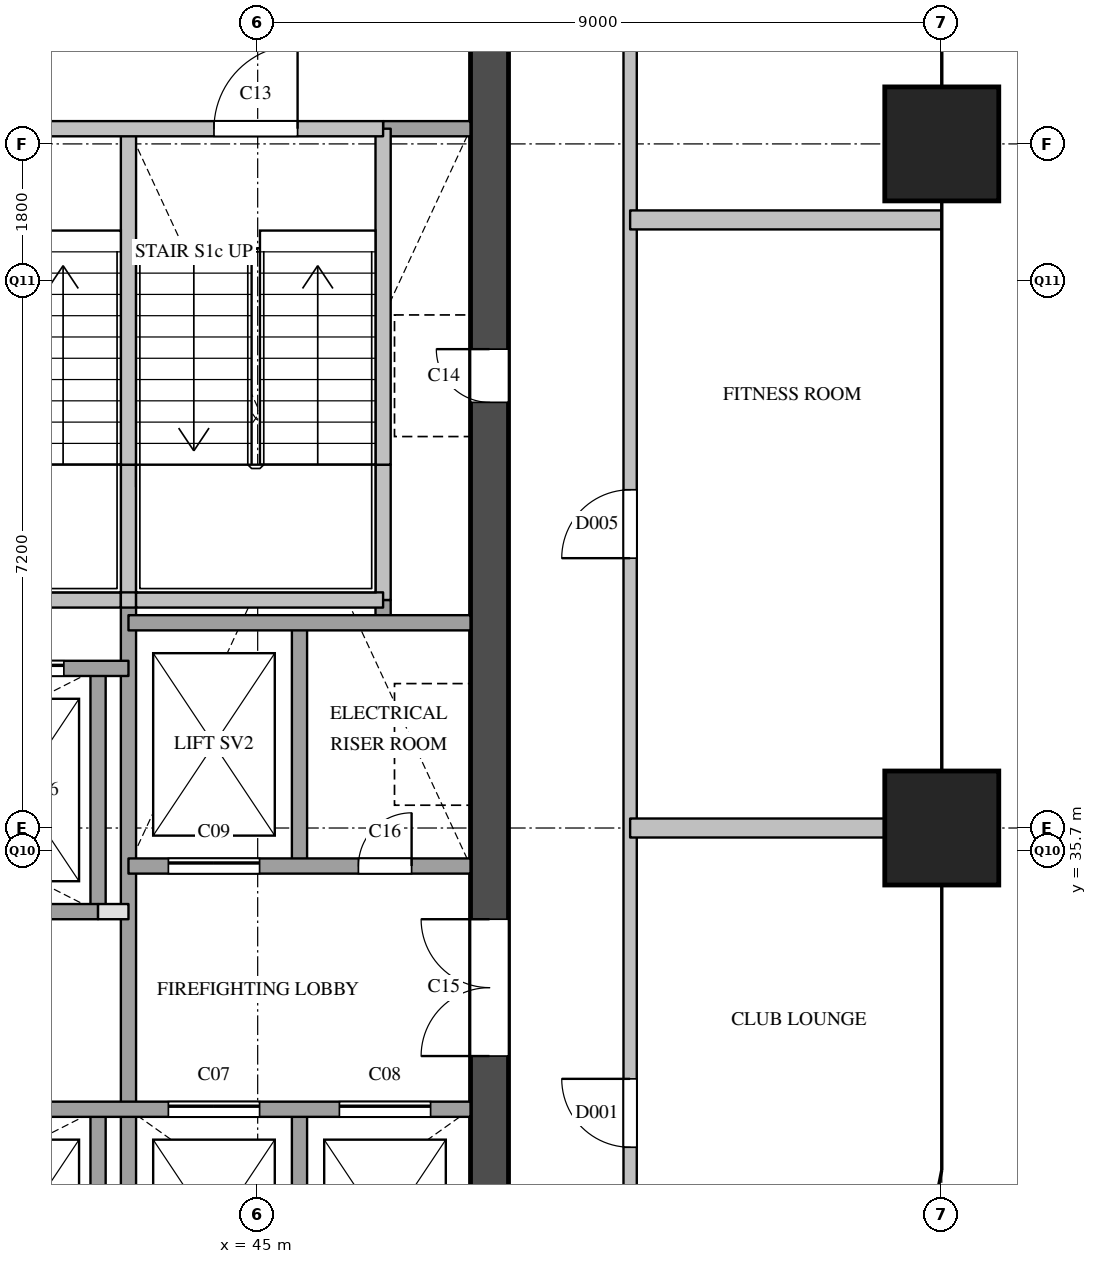
"""IFC4 building model, lengths in metres.
Left out: names, types, materials, properties, quantities, classifications, styles, units other than length and angle.
Written with IfcOpenShell. Run it as: python <this file> out.ifc"""

import sys

from ifc_helpers import new_model, si_unit, direction, frame, frame_2d, origin, origin_2d, place, context, subcontext, project, spatial, rectangle, extrude, element, fill, save


model = new_model("IFC4")
c1 = context("Model", 3, precision=1e-05, world=origin(), true_north=direction((0.0, 1.0)))
c2 = subcontext(c1, "Body", "Model", "MODEL_VIEW")
j1 = project(units=[si_unit("LENGTHUNIT", "METRE"), si_unit("PLANEANGLEUNIT", "RADIAN")], contexts=[c1])
p1 = place(None, origin())
s1 = spatial("IfcSite", under=j1, at=p1, CompositionType="ELEMENT")
p2 = place(p1, origin())
s2 = spatial("IfcBuilding", under=s1, at=p2, CompositionType="ELEMENT")
p3 = place(p2, frame((0.0, 0.0, 138.8)))
s3 = spatial("IfcBuildingStorey", under=s2, at=p3, CompositionType="ELEMENT", Elevation=138.8)
for number, where, z_axis, x_axis in (
    (1, (54.0, 36.0, 0.0), (0.0, 0.0, 1.0), (1.0, 0.0, 0.0)),
    (2, (54.0, 45.0, 0.0), (0.0, 0.0, 1.0), (1.0, 0.0, 0.0)),
):
    element("IfcColumn", number, at=place(p3, frame(where, z_axis=z_axis, x_axis=x_axis)), inside=s3, PredefinedType="COLUMN", context=c2, shape_type="SweptSolid", body=[
        extrude(rectangle(XDim=1.5, YDim=1.5, at=origin_2d()), origin(), (0.0, 0.0, 1.0), 3.9),
    ])
p4 = place(p3, frame((48.05, 29.1, 0.0), z_axis=(0.0, 0.0, 1.0), x_axis=(0.0, 1.0, 0.0)))
e3 = element("IfcWall", 3, at=p4, inside=s3, PredefinedType="SHEAR", context=c2, shape_type="SweptSolid", body=[
    extrude(rectangle(XDim=20.3, YDim=0.5, at=frame_2d((10.15, 0.0))), origin(), (0.0, 0.0, 1.0), 3.6),
])
p5 = place(p4, frame((12.5, 0.0, 0.0)))
e4 = element("IfcOpeningElement", 4, at=p5, cuts=e3, PredefinedType="OPENING", context=c2, shape_type="SweptSolid", body=[
    extrude(rectangle(XDim=0.7, YDim=2.1, at=frame_2d((0.35, 1.05))), frame((0.0, 0.26, 0.0), z_axis=(0.0, -1.0, 0.0), x_axis=(1.0, 0.0, 0.0)), (0.0, 0.0, 1.0), 0.52),
])
p6 = place(p4, frame((3.9, 0.0, 0.0)))
e5 = element("IfcOpeningElement", 5, at=p6, cuts=e3, PredefinedType="OPENING", context=c2, shape_type="SweptSolid", body=[
    extrude(rectangle(XDim=1.8, YDim=2.1, at=frame_2d((0.9, 1.05))), frame((0.0, 0.26, 0.0), z_axis=(0.0, -1.0, 0.0), x_axis=(1.0, 0.0, 0.0)), (0.0, 0.0, 1.0), 0.52),
])
p7 = place(p3, frame((42.9, 29.1, 0.0), z_axis=(0.0, 0.0, 1.0), x_axis=(0.0, 1.0, 0.0)))
e6 = element("IfcWall", 6, at=p7, inside=s3, PredefinedType="SOLIDWALL", context=c2, shape_type="SweptSolid", body=[
    extrude(rectangle(XDim=3.2, YDim=0.2, at=frame_2d((1.6, 0.0))), origin(), (0.0, 0.0, 1.0), 3.6),
])
p8 = place(p3, frame((42.9, 34.9, 0.0), z_axis=(0.0, 0.0, 1.0), x_axis=(0.0, 1.0, 0.0)))
e7 = element("IfcWall", 7, at=p8, inside=s3, PredefinedType="SOLIDWALL", context=c2, shape_type="SweptSolid", body=[
    extrude(rectangle(XDim=3.2, YDim=0.2, at=frame_2d((1.6, 0.0))), origin(), (0.0, 0.0, 1.0), 3.6),
])
p9 = place(p3, frame((43.3, 29.1, 0.0), z_axis=(0.0, 0.0, 1.0), x_axis=(0.0, 1.0, 0.0)))
e8 = element("IfcWall", 8, at=p9, inside=s3, PredefinedType="SOLIDWALL", context=c2, shape_type="SweptSolid", body=[
    extrude(rectangle(XDim=9.9, YDim=0.2, at=frame_2d((4.95, 0.0))), origin(), (0.0, 0.0, 1.0), 3.6),
])
p10 = place(p3, frame((43.3, 39.0, 0.0), z_axis=(0.0, 0.0, 1.0), x_axis=(0.0, 1.0, 0.0)))
e9 = element("IfcWall", 9, at=p10, inside=s3, PredefinedType="SOLIDWALL", context=c2, shape_type="SweptSolid", body=[
    extrude(rectangle(XDim=1.78, YDim=0.2, at=frame_2d((0.89, 0.0))), origin(), (0.0, 0.0, 1.0), 3.6),
])
p11 = place(p3, frame((43.3, 40.78, 0.0), z_axis=(0.0, 0.0, 1.0), x_axis=(0.0, 1.0, 0.0)))
e10 = element("IfcWall", 10, at=p11, inside=s3, PredefinedType="SOLIDWALL", context=c2, shape_type="SweptSolid", body=[
    extrude(rectangle(XDim=4.42, YDim=0.2, at=frame_2d((2.21, 0.0))), origin(), (0.0, 0.0, 1.0), 3.6),
])
for number, where, z_axis, x_axis in (
    (11, (45.55, 29.1, 0.0), (0.0, 0.0, 1.0), (0.0, 1.0, 0.0)),
    (12, (45.55, 35.5, 0.0), (0.0, 0.0, 1.0), (0.0, 1.0, 0.0)),
):
    element("IfcWall", number, at=place(p3, frame(where, z_axis=z_axis, x_axis=x_axis)), inside=s3, PredefinedType="SOLIDWALL", context=c2, shape_type="SweptSolid", body=[
        extrude(rectangle(XDim=3.2, YDim=0.2, at=frame_2d((1.6, 0.0))), origin(), (0.0, 0.0, 1.0), 3.6),
    ])
p12 = place(p3, frame((46.65, 38.7, 0.0), z_axis=(0.0, 0.0, 1.0), x_axis=(0.0, 1.0, 0.0)))
e13 = element("IfcWall", 13, at=p12, inside=s3, PredefinedType="SOLIDWALL", context=c2, shape_type="SweptSolid", body=[
    extrude(rectangle(XDim=0.3, YDim=0.2, at=frame_2d((0.15, 0.0))), origin(), (0.0, 0.0, 1.0), 3.6),
])
p13 = place(p3, frame((46.65, 39.0, 0.0), z_axis=(0.0, 0.0, 1.0), x_axis=(0.0, 1.0, 0.0)))
e14 = element("IfcWall", 14, at=p13, inside=s3, PredefinedType="SOLIDWALL", context=c2, shape_type="SweptSolid", body=[
    extrude(rectangle(XDim=1.78, YDim=0.2, at=frame_2d((0.89, 0.0))), origin(), (0.0, 0.0, 1.0), 3.6),
])
p14 = place(p3, frame((46.65, 40.78, 0.0), z_axis=(0.0, 0.0, 1.0), x_axis=(0.0, 1.0, 0.0)))
e15 = element("IfcWall", 15, at=p14, inside=s3, PredefinedType="SOLIDWALL", context=c2, shape_type="SweptSolid", body=[
    extrude(rectangle(XDim=4.42, YDim=0.2, at=frame_2d((2.21, 0.0))), origin(), (0.0, 0.0, 1.0), 3.6),
])
p15 = place(p3, frame((36.6, 32.3, 0.0), z_axis=(0.0, 0.0, 1.0), x_axis=(1.0, 0.0, 0.0)))
e16 = element("IfcWall", 16, at=p15, inside=s3, PredefinedType="SOLIDWALL", context=c2, shape_type="SweptSolid", body=[
    extrude(rectangle(XDim=11.2, YDim=0.2, at=frame_2d((5.6, 0.0))), origin(), (0.0, 0.0, 1.0), 3.6),
])
p16 = place(p15, frame((7.225, 0.0, 0.0)))
e17 = element("IfcOpeningElement", 17, at=p16, cuts=e16, PredefinedType="OPENING", context=c2, shape_type="SweptSolid", body=[
    extrude(rectangle(XDim=1.2, YDim=2.1, at=frame_2d((0.6, 1.05))), frame((0.0, 0.11, 0.0), z_axis=(0.0, -1.0, 0.0), x_axis=(1.0, 0.0, 0.0)), (0.0, 0.0, 1.0), 0.22),
])
p17 = place(p15, frame((9.475, 0.0, 0.0)))
e18 = element("IfcOpeningElement", 18, at=p17, cuts=e16, PredefinedType="OPENING", context=c2, shape_type="SweptSolid", body=[
    extrude(rectangle(XDim=1.2, YDim=2.1, at=frame_2d((0.6, 1.05))), frame((0.0, 0.11, 0.0), z_axis=(0.0, -1.0, 0.0), x_axis=(1.0, 0.0, 0.0)), (0.0, 0.0, 1.0), 0.22),
])
p18 = place(p3, frame((42.9, 34.9, 0.0), z_axis=(0.0, 0.0, 1.0), x_axis=(1.0, 0.0, 0.0)))
e19 = element("IfcWall", 19, at=p18, inside=s3, PredefinedType="PARTITIONING", context=c2, shape_type="SweptSolid", body=[
    extrude(rectangle(XDim=0.4, YDim=0.2, at=frame_2d((0.2, 0.0))), origin(), (0.0, 0.0, 1.0), 3.6),
])
p19 = place(p3, frame((36.6, 34.9, 0.0), z_axis=(0.0, 0.0, 1.0), x_axis=(1.0, 0.0, 0.0)))
e20 = element("IfcWall", 20, at=p19, inside=s3, PredefinedType="SOLIDWALL", context=c2, shape_type="SweptSolid", body=[
    extrude(rectangle(XDim=6.3, YDim=0.2, at=frame_2d((3.15, 0.0))), origin(), (0.0, 0.0, 1.0), 3.6),
])
p20 = place(p3, frame((43.3, 35.5, 0.0), z_axis=(0.0, 0.0, 1.0), x_axis=(1.0, 0.0, 0.0)))
e21 = element("IfcWall", 21, at=p20, inside=s3, PredefinedType="SOLIDWALL", context=c2, shape_type="SweptSolid", body=[
    extrude(rectangle(XDim=4.5, YDim=0.2, at=frame_2d((2.25, 0.0))), origin(), (0.0, 0.0, 1.0), 3.6),
])
p21 = place(p20, frame((0.525, 0.0, 0.0)))
e22 = element("IfcOpeningElement", 22, at=p21, cuts=e21, PredefinedType="OPENING", context=c2, shape_type="SweptSolid", body=[
    extrude(rectangle(XDim=1.2, YDim=2.1, at=frame_2d((0.6, 1.05))), frame((0.0, 0.11, 0.0), z_axis=(0.0, -1.0, 0.0), x_axis=(1.0, 0.0, 0.0)), (0.0, 0.0, 1.0), 0.22),
])
p22 = place(p20, frame((3.025, 0.0, 0.0)))
e23 = element("IfcOpeningElement", 23, at=p22, cuts=e21, PredefinedType="OPENING", context=c2, shape_type="SweptSolid", body=[
    extrude(rectangle(XDim=0.7, YDim=2.1, at=frame_2d((0.35, 1.05))), frame((0.0, 0.11, 0.0), z_axis=(0.0, -1.0, 0.0), x_axis=(1.0, 0.0, 0.0)), (0.0, 0.0, 1.0), 0.22),
])
p23 = place(p3, frame((36.6, 38.1, 0.0), z_axis=(0.0, 0.0, 1.0), x_axis=(1.0, 0.0, 0.0)))
e24 = element("IfcWall", 24, at=p23, inside=s3, PredefinedType="SOLIDWALL", context=c2, shape_type="SweptSolid", body=[
    extrude(rectangle(XDim=6.7, YDim=0.2, at=frame_2d((3.35, 0.0))), origin(), (0.0, 0.0, 1.0), 3.6),
])
p24 = place(p23, frame((0.45, 0.0, 0.0)))
e25 = element("IfcOpeningElement", 25, at=p24, cuts=e24, PredefinedType="OPENING", context=c2, shape_type="SweptSolid", body=[
    extrude(rectangle(XDim=1.2, YDim=2.1, at=frame_2d((0.6, 1.05))), frame((0.0, 0.11, 0.0), z_axis=(0.0, -1.0, 0.0), x_axis=(1.0, 0.0, 0.0)), (0.0, 0.0, 1.0), 0.22),
])
p25 = place(p23, frame((2.55, 0.0, 0.0)))
e26 = element("IfcOpeningElement", 26, at=p25, cuts=e24, PredefinedType="OPENING", context=c2, shape_type="SweptSolid", body=[
    extrude(rectangle(XDim=1.2, YDim=2.1, at=frame_2d((0.6, 1.05))), frame((0.0, 0.11, 0.0), z_axis=(0.0, -1.0, 0.0), x_axis=(1.0, 0.0, 0.0)), (0.0, 0.0, 1.0), 0.22),
])
p26 = place(p23, frame((4.65, 0.0, 0.0)))
e27 = element("IfcOpeningElement", 27, at=p26, cuts=e24, PredefinedType="OPENING", context=c2, shape_type="SweptSolid", body=[
    extrude(rectangle(XDim=1.2, YDim=2.1, at=frame_2d((0.6, 1.05))), frame((0.0, 0.11, 0.0), z_axis=(0.0, -1.0, 0.0), x_axis=(1.0, 0.0, 0.0)), (0.0, 0.0, 1.0), 0.22),
])
p27 = place(p3, frame((43.3, 38.7, 0.0), z_axis=(0.0, 0.0, 1.0), x_axis=(1.0, 0.0, 0.0)))
e28 = element("IfcWall", 28, at=p27, inside=s3, PredefinedType="SOLIDWALL", context=c2, shape_type="SweptSolid", body=[
    extrude(rectangle(XDim=4.5, YDim=0.2, at=frame_2d((2.25, 0.0))), origin(), (0.0, 0.0, 1.0), 3.6),
])
p28 = place(p3, frame((40.05, 39.0, 0.0), z_axis=(0.0, 0.0, 1.0), x_axis=(1.0, 0.0, 0.0)))
e29 = element("IfcWall", 29, at=p28, inside=s3, PredefinedType="SOLIDWALL", context=c2, shape_type="SweptSolid", body=[
    extrude(rectangle(XDim=3.15, YDim=0.2, at=frame_2d((1.575, 0.0))), origin(), (0.0, 0.0, 1.0), 3.6),
])
p29 = place(p3, frame((43.2, 39.0, 0.0), z_axis=(0.0, 0.0, 1.0), x_axis=(1.0, 0.0, 0.0)))
e30 = element("IfcWall", 30, at=p29, inside=s3, PredefinedType="SOLIDWALL", context=c2, shape_type="SweptSolid", body=[
    extrude(rectangle(XDim=0.2, YDim=0.2, at=frame_2d((0.1, 0.0))), origin(), (0.0, 0.0, 1.0), 3.6),
])
p30 = place(p3, frame((43.4, 39.0, 0.0), z_axis=(0.0, 0.0, 1.0), x_axis=(1.0, 0.0, 0.0)))
e31 = element("IfcWall", 31, at=p30, inside=s3, PredefinedType="SOLIDWALL", context=c2, shape_type="SweptSolid", body=[
    extrude(rectangle(XDim=3.25, YDim=0.2, at=frame_2d((1.625, 0.0))), origin(), (0.0, 0.0, 1.0), 3.6),
])
p31 = place(p3, frame((46.65, 45.2, 0.0), z_axis=(0.0, 0.0, 1.0), x_axis=(1.0, 0.0, 0.0)))
e32 = element("IfcWall", 32, at=p31, inside=s3, PredefinedType="SOLIDWALL", context=c2, shape_type="SweptSolid", body=[
    extrude(rectangle(XDim=1.15, YDim=0.2, at=frame_2d((0.575, 0.0))), origin(), (0.0, 0.0, 1.0), 3.6),
])
p32 = place(p3, frame((36.6, 45.2, 0.0), z_axis=(0.0, 0.0, 1.0), x_axis=(1.0, 0.0, 0.0)))
e33 = element("IfcWall", 33, at=p32, inside=s3, PredefinedType="SOLIDWALL", context=c2, shape_type="SweptSolid", body=[
    extrude(rectangle(XDim=10.05, YDim=0.2, at=frame_2d((5.025, 0.0))), origin(), (0.0, 0.0, 1.0), 3.6),
])
p33 = place(p32, frame((1.125, 0.0, 0.0)))
e34 = element("IfcOpeningElement", 34, at=p33, cuts=e33, PredefinedType="OPENING", context=c2, shape_type="SweptSolid", body=[
    extrude(rectangle(XDim=1.1, YDim=2.1, at=frame_2d((0.55, 1.05))), frame((0.0, 0.11, 0.0), z_axis=(0.0, -1.0, 0.0), x_axis=(1.0, 0.0, 0.0)), (0.0, 0.0, 1.0), 0.22),
])
p34 = place(p32, frame((4.475, 0.0, 0.0)))
e35 = element("IfcOpeningElement", 35, at=p34, cuts=e33, PredefinedType="OPENING", context=c2, shape_type="SweptSolid", body=[
    extrude(rectangle(XDim=1.1, YDim=2.1, at=frame_2d((0.55, 1.05))), frame((0.0, 0.11, 0.0), z_axis=(0.0, -1.0, 0.0), x_axis=(1.0, 0.0, 0.0)), (0.0, 0.0, 1.0), 0.22),
])
p35 = place(p32, frame((7.825, 0.0, 0.0)))
e36 = element("IfcOpeningElement", 36, at=p35, cuts=e33, PredefinedType="OPENING", context=c2, shape_type="SweptSolid", body=[
    extrude(rectangle(XDim=1.1, YDim=2.1, at=frame_2d((0.55, 1.05))), frame((0.0, 0.11, 0.0), z_axis=(0.0, -1.0, 0.0), x_axis=(1.0, 0.0, 0.0)), (0.0, 0.0, 1.0), 0.22),
])
p36 = place(p3, frame((49.9, 28.5, 0.0), z_axis=(0.0, 0.0, 1.0), x_axis=(0.0, 1.0, 0.0)))
e37 = element("IfcWall", 37, at=p36, inside=s3, PredefinedType="PARTITIONING", context=c2, shape_type="SweptSolid", body=[
    extrude(rectangle(XDim=23.0, YDim=0.175, at=frame_2d((11.5, 0.0))), origin(), (0.0, 0.0, 1.0), 3.6),
])
p37 = place(p36, frame((3.3, 0.0, 0.0)))
e38 = element("IfcOpeningElement", 38, at=p37, cuts=e37, PredefinedType="OPENING", context=c2, shape_type="SweptSolid", body=[
    extrude(rectangle(XDim=0.9, YDim=2.1, at=frame_2d((0.45, 1.05))), frame((0.0, 0.097, 0.0), z_axis=(0.0, -1.0, 0.0), x_axis=(1.0, 0.0, 0.0)), (0.0, 0.0, 1.0), 0.195),
])
p38 = place(p36, frame((11.05, 0.0, 0.0)))
e39 = element("IfcOpeningElement", 39, at=p38, cuts=e37, PredefinedType="OPENING", context=c2, shape_type="SweptSolid", body=[
    extrude(rectangle(XDim=0.9, YDim=2.1, at=frame_2d((0.45, 1.05))), frame((0.0, 0.097, 0.0), z_axis=(0.0, -1.0, 0.0), x_axis=(1.0, 0.0, 0.0)), (0.0, 0.0, 1.0), 0.195),
])
p39 = place(p36, frame((18.8, 0.0, 0.0)))
e40 = element("IfcOpeningElement", 40, at=p39, cuts=e37, PredefinedType="OPENING", context=c2, shape_type="SweptSolid", body=[
    extrude(rectangle(XDim=0.9, YDim=2.1, at=frame_2d((0.45, 1.05))), frame((0.0, 0.097, 0.0), z_axis=(0.0, -1.0, 0.0), x_axis=(1.0, 0.0, 0.0)), (0.0, 0.0, 1.0), 0.195),
])
p40 = place(p3, frame((49.9, 36.0, 0.0), z_axis=(0.0, 0.0, 1.0), x_axis=(1.0, 0.0, 0.0)))
e41 = element("IfcWall", 41, at=p40, inside=s3, PredefinedType="PARTITIONING", context=c2, shape_type="SweptSolid", body=[
    extrude(rectangle(XDim=4.1, YDim=0.25, at=frame_2d((2.05, 0.0))), origin(), (0.0, 0.0, 1.0), 3.6),
])
p41 = place(p3, frame((49.9, 44.0, 0.0), z_axis=(0.0, 0.0, 1.0), x_axis=(1.0, 0.0, 0.0)))
e42 = element("IfcWall", 42, at=p41, inside=s3, PredefinedType="PARTITIONING", context=c2, shape_type="SweptSolid", body=[
    extrude(rectangle(XDim=4.1, YDim=0.25, at=frame_2d((2.05, 0.0))), origin(), (0.0, 0.0, 1.0), 2.6),
])
p42 = place(p26, origin())
e43 = element("IfcDoor", 43, at=p42, inside=s3, OperationType="SLIDING_TO_LEFT", PredefinedType="DOOR", context=c2, shape_type="SweptSolid", body=[
    extrude(rectangle(XDim=1.2, YDim=2.1, at=frame_2d((0.6, 1.05))), frame((0.0, 0.025, 0.0), z_axis=(0.0, -1.0, 0.0), x_axis=(1.0, 0.0, 0.0)), (0.0, 0.0, 1.0), 0.05),
])
fill(e27, e43)
p43 = place(p16, origin())
e44 = element("IfcDoor", 44, at=p43, inside=s3, OperationType="SLIDING_TO_LEFT", PredefinedType="DOOR", context=c2, shape_type="SweptSolid", body=[
    extrude(rectangle(XDim=1.2, YDim=2.1, at=frame_2d((0.6, 1.05))), frame((0.0, 0.025, 0.0), z_axis=(0.0, -1.0, 0.0), x_axis=(1.0, 0.0, 0.0)), (0.0, 0.0, 1.0), 0.05),
])
fill(e17, e44)
p44 = place(p17, origin())
e45 = element("IfcDoor", 45, at=p44, inside=s3, OperationType="SLIDING_TO_LEFT", PredefinedType="DOOR", context=c2, shape_type="SweptSolid", body=[
    extrude(rectangle(XDim=1.2, YDim=2.1, at=frame_2d((0.6, 1.05))), frame((0.0, 0.025, 0.0), z_axis=(0.0, -1.0, 0.0), x_axis=(1.0, 0.0, 0.0)), (0.0, 0.0, 1.0), 0.05),
])
fill(e18, e45)
p45 = place(p21, origin())
e46 = element("IfcDoor", 46, at=p45, inside=s3, OperationType="SLIDING_TO_LEFT", PredefinedType="DOOR", context=c2, shape_type="SweptSolid", body=[
    extrude(rectangle(XDim=1.2, YDim=2.1, at=frame_2d((0.6, 1.05))), frame((0.0, 0.025, 0.0), z_axis=(0.0, -1.0, 0.0), x_axis=(1.0, 0.0, 0.0)), (0.0, 0.0, 1.0), 0.05),
])
fill(e22, e46)
p46 = place(p35, origin())
e47 = element("IfcDoor", 47, at=p46, inside=s3, OperationType="SINGLE_SWING_RIGHT", PredefinedType="DOOR", context=c2, shape_type="SweptSolid", body=[
    extrude(rectangle(XDim=1.1, YDim=2.1, at=frame_2d((0.55, 1.05))), frame((0.0, 0.025, 0.0), z_axis=(0.0, -1.0, 0.0), x_axis=(1.0, 0.0, 0.0)), (0.0, 0.0, 1.0), 0.05),
])
fill(e36, e47)
p47 = place(p5, origin())
e48 = element("IfcDoor", 48, at=p47, inside=s3, OperationType="SINGLE_SWING_RIGHT", PredefinedType="DOOR", context=c2, shape_type="SweptSolid", body=[
    extrude(rectangle(XDim=0.7, YDim=2.1, at=frame_2d((0.35, 1.05))), frame((0.0, 0.025, 0.0), z_axis=(0.0, -1.0, 0.0), x_axis=(1.0, 0.0, 0.0)), (0.0, 0.0, 1.0), 0.05),
])
fill(e4, e48)
p48 = place(p6, origin())
e49 = element("IfcDoor", 49, at=p48, inside=s3, OperationType="DOUBLE_DOOR_SINGLE_SWING", PredefinedType="DOOR", context=c2, shape_type="SweptSolid", body=[
    extrude(rectangle(XDim=1.8, YDim=2.1, at=frame_2d((0.9, 1.05))), frame((0.0, 0.025, 0.0), z_axis=(0.0, -1.0, 0.0), x_axis=(1.0, 0.0, 0.0)), (0.0, 0.0, 1.0), 0.05),
])
fill(e5, e49)
p49 = place(p22, origin())
e50 = element("IfcDoor", 50, at=p49, inside=s3, OperationType="SINGLE_SWING_RIGHT", PredefinedType="DOOR", context=c2, shape_type="SweptSolid", body=[
    extrude(rectangle(XDim=0.7, YDim=2.1, at=frame_2d((0.35, 1.05))), frame((0.0, 0.025, 0.0), z_axis=(0.0, -1.0, 0.0), x_axis=(1.0, 0.0, 0.0)), (0.0, 0.0, 1.0), 0.05),
])
fill(e23, e50)
p50 = place(p37, origin())
e51 = element("IfcDoor", 51, at=p50, inside=s3, OperationType="SINGLE_SWING_RIGHT", PredefinedType="DOOR", context=c2, shape_type="SweptSolid", body=[
    extrude(rectangle(XDim=0.9, YDim=2.1, at=frame_2d((0.45, 1.05))), frame((0.0, 0.025, 0.0), z_axis=(0.0, -1.0, 0.0), x_axis=(1.0, 0.0, 0.0)), (0.0, 0.0, 1.0), 0.05),
])
fill(e38, e51)
p51 = place(p38, origin())
e52 = element("IfcDoor", 52, at=p51, inside=s3, OperationType="SINGLE_SWING_LEFT", PredefinedType="DOOR", context=c2, shape_type="SweptSolid", body=[
    extrude(rectangle(XDim=0.9, YDim=2.1, at=frame_2d((0.45, 1.05))), frame((0.0, 0.025, 0.0), z_axis=(0.0, -1.0, 0.0), x_axis=(1.0, 0.0, 0.0)), (0.0, 0.0, 1.0), 0.05),
])
fill(e39, e52)
save(model, sys.argv[1])
